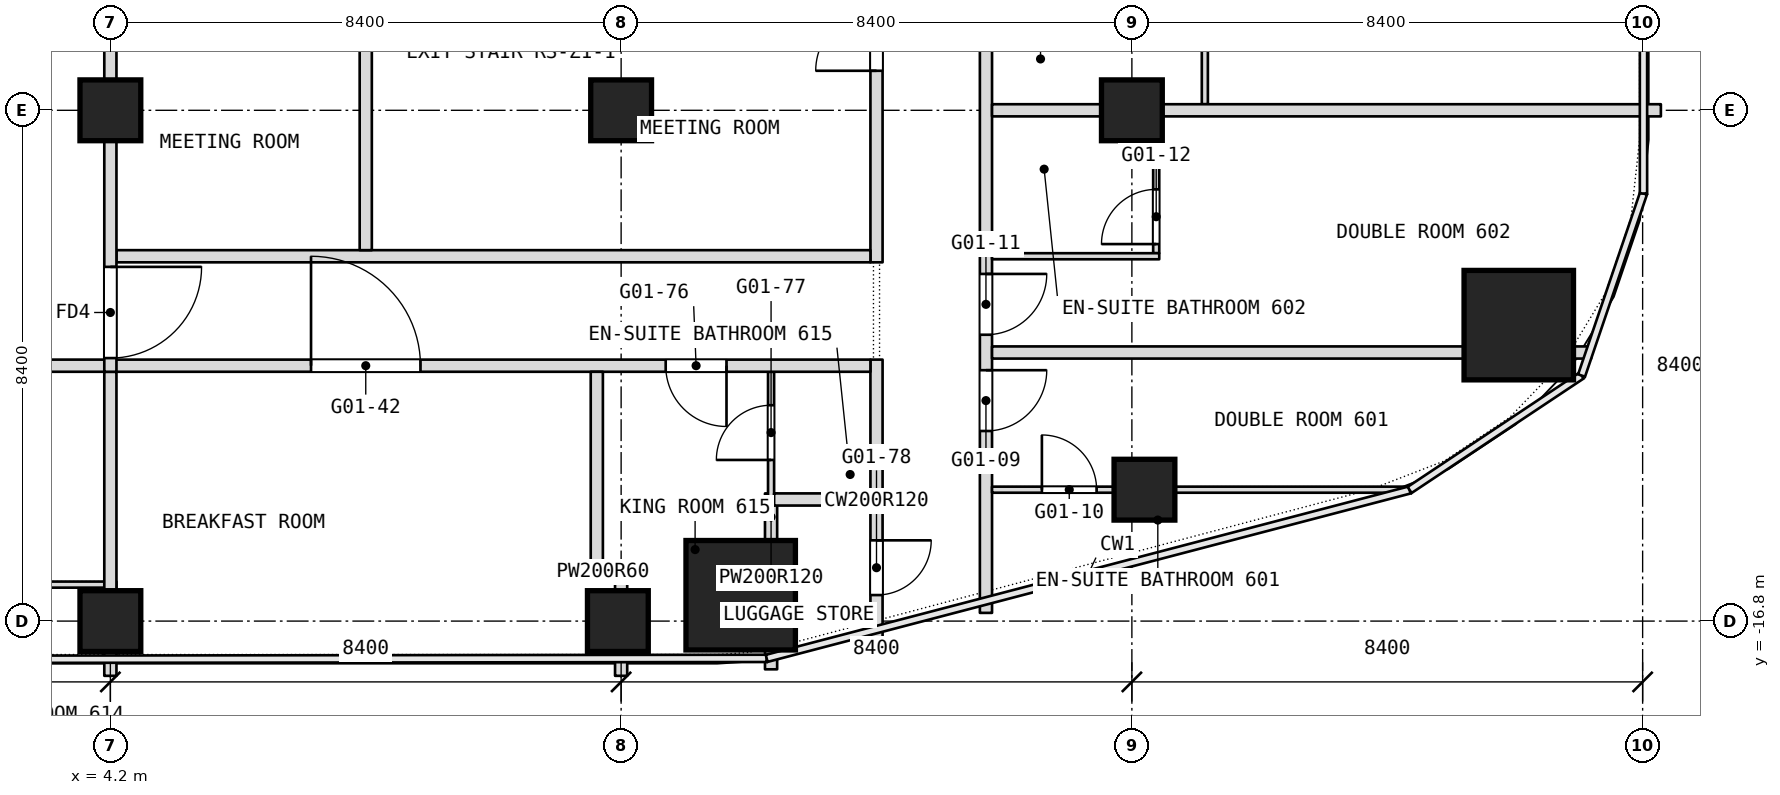
"""IFC4 building model, lengths in metres.
Left out: names, types, materials, properties, quantities, classifications, styles, units other than length and angle.
Written with IfcOpenShell. Run it as: python <this file> out.ifc"""

import sys

from ifc_helpers import new_model, si_unit, direction, frame, frame_2d, origin, origin_2d, place, context, subcontext, project, spatial, rectangle, extrude, element, fill, save


model = new_model("IFC4")
c1 = context("Model", 3, precision=1e-05, world=origin(), true_north=direction((0.0, 1.0)))
c2 = subcontext(c1, "Body", "Model", "MODEL_VIEW")
j1 = project(units=[si_unit("LENGTHUNIT", "METRE"), si_unit("PLANEANGLEUNIT", "RADIAN")], contexts=[c1])
p1 = place(None, origin())
s1 = spatial("IfcSite", under=j1, at=p1, CompositionType="ELEMENT")
p2 = place(p1, origin())
s2 = spatial("IfcBuilding", under=s1, at=p2, CompositionType="ELEMENT")
p3 = place(p2, frame((0.0, 0.0, 36.5)))
s3 = spatial("IfcBuildingStorey", under=s2, at=p3, CompositionType="ELEMENT", Elevation=36.5)
p4 = place(p3, frame((14.566, -16.375, 0.0), z_axis=(0.0, 0.0, 1.0), x_axis=(1.0, 0.0, 0.0)))
e1 = element("IfcColumn", 1, at=p4, inside=s3, PredefinedType="COLUMN", context=c2, shape_type="SweptSolid", body=[
    extrude(rectangle(XDim=1.8, YDim=1.8, at=origin_2d()), origin(), (0.0, 0.0, 1.0), 3.6),
])
p5 = place(p3, frame((27.363, -11.933, -0.15), z_axis=(0.0, 0.0, 1.0), x_axis=(1.0, 0.0, 0.0)))
e2 = element("IfcColumn", 2, at=p5, inside=s3, PredefinedType="COLUMN", context=c2, shape_type="SweptSolid", body=[
    extrude(rectangle(XDim=1.8, YDim=1.8, at=origin_2d()), origin(), (0.0, 0.0, 1.0), 3.75),
])
for number, where, z_axis, x_axis in (
    (3, (4.2, -8.4, -0.15), (0.0, 0.0, 1.0), (1.0, 0.0, 0.0)),
    (4, (12.6, -8.4, -0.15), (0.0, 0.0, 1.0), (1.0, 0.0, 0.0)),
    (5, (21.0, -8.4, -0.15), (0.0, 0.0, 1.0), (1.0, 0.0, 0.0)),
    (6, (21.207, -14.639, -0.15), (0.0, 0.0, 1.0), (1.0, 0.0, 0.0)),
):
    element("IfcColumn", number, at=place(p3, frame(where, z_axis=z_axis, x_axis=x_axis)), inside=s3, PredefinedType="COLUMN", context=c2, shape_type="SweptSolid", body=[
        extrude(rectangle(XDim=1.0, YDim=1.0, at=origin_2d()), origin(), (0.0, 0.0, 1.0), 3.75),
    ])
p6 = place(p3, frame((22.2, -8.3, 0.0), z_axis=(0.0, 0.0, 1.0), x_axis=(0.0, 1.0, 0.0)))
e7 = element("IfcWall", 7, at=p6, inside=s3, PredefinedType="PARTITIONING", context=c2, shape_type="SweptSolid", body=[
    extrude(rectangle(XDim=2.35, YDim=0.1, at=frame_2d((1.175, 0.0))), origin(), (0.0, 0.0, 1.0), 3.34),
])
p7 = place(p3, frame((21.4, -10.75, 0.0), z_axis=(0.0, 0.0, 1.0), x_axis=(0.0, 1.0, 0.0)))
e8 = element("IfcWall", 8, at=p7, inside=s3, PredefinedType="PARTITIONING", context=c2, shape_type="SweptSolid", body=[
    extrude(rectangle(XDim=2.45, YDim=0.1, at=frame_2d((1.225, 0.0))), origin(), (0.0, 0.0, 1.0), 3.34),
])
p8 = place(p7, frame((0.15, 0.0, 0.0)))
e9 = element("IfcOpeningElement", 9, at=p8, cuts=e8, PredefinedType="OPENING", context=c2, shape_type="SweptSolid", body=[
    extrude(rectangle(XDim=0.9, YDim=2.1, at=frame_2d((0.45, 1.05))), frame((0.0, 0.05, 0.0), z_axis=(0.0, -1.0, 0.0), x_axis=(1.0, 0.0, 0.0)), (0.0, 0.0, 1.0), 0.1),
])
p9 = place(p3, frame((18.6, -16.665, 0.0), z_axis=(0.0, 0.0, 1.0), x_axis=(0.0, 1.0, 0.0)))
e10 = element("IfcWall", 10, at=p9, inside=s3, PredefinedType="PARTITIONING", context=c2, shape_type="SweptSolid", body=[
    extrude(rectangle(XDim=50.205, YDim=0.2, at=frame_2d((25.103, 0.0))), origin(), (0.0, 0.0, 1.0), 3.34),
])
p10 = place(p9, frame((2.991, 0.0, 0.0)))
e11 = element("IfcOpeningElement", 11, at=p10, cuts=e10, PredefinedType="OPENING", context=c2, shape_type="SweptSolid", body=[
    extrude(rectangle(XDim=1.0, YDim=2.1, at=frame_2d((0.5, 1.05))), frame((0.0, 0.1, 0.0), z_axis=(0.0, -1.0, 0.0), x_axis=(1.0, 0.0, 0.0)), (0.0, 0.0, 1.0), 0.2),
])
p11 = place(p9, frame((4.574, 0.0, 0.0)))
e12 = element("IfcOpeningElement", 12, at=p11, cuts=e10, PredefinedType="OPENING", context=c2, shape_type="SweptSolid", body=[
    extrude(rectangle(XDim=1.0, YDim=2.1, at=frame_2d((0.5, 1.05))), frame((0.0, 0.1, 0.0), z_axis=(0.0, -1.0, 0.0), x_axis=(1.0, 0.0, 0.0)), (0.0, 0.0, 1.0), 0.2),
])
p12 = place(p9, frame((11.865, 0.0, 0.0)))
e13 = element("IfcOpeningElement", 13, at=p12, cuts=e10, PredefinedType="OPENING", context=c2, shape_type="SweptSolid", body=[
    extrude(rectangle(XDim=1.1, YDim=2.1, at=frame_2d((0.55, 1.05))), frame((0.0, 0.1, 0.0), z_axis=(0.0, -1.0, 0.0), x_axis=(1.0, 0.0, 0.0)), (0.0, 0.0, 1.0), 0.2),
])
p13 = place(p9, frame((22.415, 0.0, 0.0)))
e14 = element("IfcOpeningElement", 14, at=p13, cuts=e10, PredefinedType="OPENING", context=c2, shape_type="SweptSolid", body=[
    extrude(rectangle(XDim=1.1, YDim=2.1, at=frame_2d((0.55, 1.05))), frame((0.0, 0.1, 0.0), z_axis=(0.0, -1.0, 0.0), x_axis=(1.0, 0.0, 0.0)), (0.0, 0.0, 1.0), 0.2),
])
p14 = place(p9, frame((28.365, 0.0, 0.0)))
e15 = element("IfcOpeningElement", 15, at=p14, cuts=e10, PredefinedType="OPENING", context=c2, shape_type="SweptSolid", body=[
    extrude(rectangle(XDim=1.8, YDim=2.1, at=frame_2d((0.9, 1.05))), frame((0.0, 0.1, 0.0), z_axis=(0.0, -1.0, 0.0), x_axis=(1.0, 0.0, 0.0)), (0.0, 0.0, 1.0), 0.2),
])
p15 = place(p9, frame((36.765, 0.0, 0.0)))
e16 = element("IfcOpeningElement", 16, at=p15, cuts=e10, PredefinedType="OPENING", context=c2, shape_type="SweptSolid", body=[
    extrude(rectangle(XDim=1.8, YDim=2.1, at=frame_2d((0.9, 1.05))), frame((0.0, 0.1, 0.0), z_axis=(0.0, -1.0, 0.0), x_axis=(1.0, 0.0, 0.0)), (0.0, 0.0, 1.0), 0.2),
])
p16 = place(p9, frame((42.265, 0.0, 0.0)))
e17 = element("IfcOpeningElement", 17, at=p16, cuts=e10, PredefinedType="OPENING", context=c2, shape_type="SweptSolid", body=[
    extrude(rectangle(XDim=1.0, YDim=2.1, at=frame_2d((0.5, 1.05))), frame((0.0, 0.1, 0.0), z_axis=(0.0, -1.0, 0.0), x_axis=(1.0, 0.0, 0.0)), (0.0, 0.0, 1.0), 0.2),
])
p17 = place(p9, frame((47.465, 0.0, 0.0)))
e18 = element("IfcOpeningElement", 18, at=p17, cuts=e10, PredefinedType="OPENING", context=c2, shape_type="SweptSolid", body=[
    extrude(rectangle(XDim=1.0, YDim=2.1, at=frame_2d((0.5, 1.05))), frame((0.0, 0.1, 0.0), z_axis=(0.0, -1.0, 0.0), x_axis=(1.0, 0.0, 0.0)), (0.0, 0.0, 1.0), 0.2),
])
p18 = place(p3, frame((16.8, -17.143, 0.0), z_axis=(0.0, 0.0, 1.0), x_axis=(0.0, 1.0, 0.0)))
e19 = element("IfcWall", 19, at=p18, inside=s3, PredefinedType="PARTITIONING", context=c2, shape_type="SweptSolid", body=[
    extrude(rectangle(XDim=4.643, YDim=0.2, at=frame_2d((2.322, 0.0))), origin(), (0.0, 0.0, 1.0), 3.34),
])
p19 = place(p18, frame((0.771, 0.0, 0.0)))
e20 = element("IfcOpeningElement", 20, at=p19, cuts=e19, PredefinedType="OPENING", context=c2, shape_type="SweptSolid", body=[
    extrude(rectangle(XDim=0.9, YDim=2.1, at=frame_2d((0.45, 1.05))), frame((0.0, 0.1, 0.0), z_axis=(0.0, -1.0, 0.0), x_axis=(1.0, 0.0, 0.0)), (0.0, 0.0, 1.0), 0.2),
])
p20 = place(p3, frame((16.8, -10.9, 0.0), z_axis=(0.0, 0.0, 1.0), x_axis=(0.0, 1.0, 0.0)))
e21 = element("IfcWall", 21, at=p20, inside=s3, PredefinedType="PARTITIONING", context=c2, shape_type="SweptSolid", body=[
    extrude(rectangle(XDim=7.3, YDim=0.2, at=frame_2d((3.65, 0.0))), origin(), (0.0, 0.0, 1.0), 3.34),
])
p21 = place(p20, frame((3.15, 0.0, 0.0)))
e22 = element("IfcOpeningElement", 22, at=p21, cuts=e21, PredefinedType="OPENING", context=c2, shape_type="SweptSolid", body=[
    extrude(rectangle(XDim=1.0, YDim=2.1, at=frame_2d((0.5, 1.05))), frame((0.0, 0.1, 0.0), z_axis=(0.0, -1.0, 0.0), x_axis=(1.0, 0.0, 0.0)), (0.0, 0.0, 1.0), 0.2),
])
p22 = place(p3, frame((0.65, -16.2, 0.0), z_axis=(0.0, 0.0, 1.0), x_axis=(1.0, 0.0, 0.0)))
e23 = element("IfcWall", 23, at=p22, inside=s3, PredefinedType="PARTITIONING", context=c2, shape_type="SweptSolid", body=[
    extrude(rectangle(XDim=3.65, YDim=0.1, at=frame_2d((1.825, 0.0))), origin(), (0.0, 0.0, 1.0), 2.94),
])
p23 = place(p22, frame((0.15, 0.0, 0.0)))
e24 = element("IfcOpeningElement", 24, at=p23, cuts=e23, PredefinedType="OPENING", context=c2, shape_type="SweptSolid", body=[
    extrude(rectangle(XDim=0.9, YDim=2.1, at=frame_2d((0.45, 1.05))), frame((0.0, 0.05, 0.0), z_axis=(0.0, -1.0, 0.0), x_axis=(1.0, 0.0, 0.0)), (0.0, 0.0, 1.0), 0.1),
])
p24 = place(p3, frame((12.1, -16.0, 0.0), z_axis=(0.0, 0.0, 1.0), x_axis=(1.0, 0.0, 0.0)))
e25 = element("IfcWall", 25, at=p24, inside=s3, PredefinedType="PARTITIONING", context=c2, shape_type="SweptSolid", body=[
    extrude(rectangle(XDim=0.4, YDim=0.2, at=frame_2d((0.2, 0.0))), origin(), (0.0, 0.0, 1.0), 3.34),
])
p25 = place(p3, frame((15.066, -17.593, 0.0), z_axis=(0.0, 0.0, 1.0), x_axis=(0.0, 1.0, 0.0)))
e26 = element("IfcWall", 26, at=p25, inside=s3, PredefinedType="PARTITIONING", context=c2, shape_type="SweptSolid", body=[
    extrude(rectangle(XDim=0.318, YDim=0.2, at=frame_2d((0.159, 0.0))), origin(), (0.0, 0.0, 1.0), 3.34),
])
p26 = place(p3, frame((15.066, -15.475, 0.0), z_axis=(0.0, 0.0, 1.0), x_axis=(0.0, 1.0, 0.0)))
e27 = element("IfcWall", 27, at=p26, inside=s3, PredefinedType="PARTITIONING", context=c2, shape_type="SweptSolid", body=[
    extrude(rectangle(XDim=0.775, YDim=0.2, at=frame_2d((0.388, 0.0))), origin(), (0.0, 0.0, 1.0), 3.34),
])
p27 = place(p3, frame((15.066, -14.9, 0.0), z_axis=(0.0, 0.0, 1.0), x_axis=(0.0, 1.0, 0.0)))
e28 = element("IfcWall", 28, at=p27, inside=s3, PredefinedType="PARTITIONING", context=c2, shape_type="SweptSolid", body=[
    extrude(rectangle(XDim=2.2, YDim=0.1, at=frame_2d((1.1, 0.0))), origin(), (0.0, 0.0, 1.0), 3.34),
])
p28 = place(p27, frame((0.75, 0.0, 0.0)))
e29 = element("IfcOpeningElement", 29, at=p28, cuts=e28, PredefinedType="OPENING", context=c2, shape_type="SweptSolid", body=[
    extrude(rectangle(XDim=0.9, YDim=2.1, at=frame_2d((0.45, 1.05))), frame((0.0, 0.05, 0.0), z_axis=(0.0, -1.0, 0.0), x_axis=(1.0, 0.0, 0.0)), (0.0, 0.0, 1.0), 0.1),
])
p29 = place(p3, frame((15.116, -14.8, 0.0), z_axis=(0.0, 0.0, 1.0), x_axis=(1.0, 0.0, 0.0)))
e30 = element("IfcWall", 30, at=p29, inside=s3, PredefinedType="PARTITIONING", context=c2, shape_type="SweptSolid", body=[
    extrude(rectangle(XDim=1.584, YDim=0.2, at=frame_2d((0.792, 0.0))), origin(), (0.0, 0.0, 1.0), 3.34),
])
p30 = place(p3, frame((18.7, -14.639, 0.0), z_axis=(0.0, 0.0, 1.0), x_axis=(1.0, 0.0, 0.0)))
e31 = element("IfcWall", 31, at=p30, inside=s3, PredefinedType="PARTITIONING", context=c2, shape_type="SweptSolid", body=[
    extrude(rectangle(XDim=6.845, YDim=0.1, at=frame_2d((3.422, 0.0))), origin(), (0.0, 0.0, 1.0), 3.34),
])
p31 = place(p30, frame((0.82, 0.0, 0.0)))
e32 = element("IfcOpeningElement", 32, at=p31, cuts=e31, PredefinedType="OPENING", context=c2, shape_type="SweptSolid", body=[
    extrude(rectangle(XDim=0.9, YDim=2.1, at=frame_2d((0.45, 1.05))), frame((0.0, 0.05, 0.0), z_axis=(0.0, -1.0, 0.0), x_axis=(1.0, 0.0, 0.0)), (0.0, 0.0, 1.0), 0.1),
])
p32 = place(p3, frame((12.6, -17.7, 0.0), z_axis=(0.0, 0.0, 1.0), x_axis=(0.0, 1.0, 0.0)))
e33 = element("IfcWall", 33, at=p32, inside=s3, PredefinedType="PARTITIONING", context=c2, shape_type="SweptSolid", body=[
    extrude(rectangle(XDim=1.8, YDim=0.2, at=frame_2d((0.9, 0.0))), origin(), (0.0, 0.0, 1.0), 3.34),
])
p33 = place(p3, frame((-16.7, -12.6, 0.0), z_axis=(0.0, 0.0, 1.0), x_axis=(1.0, 0.0, 0.0)))
e34 = element("IfcWall", 34, at=p33, inside=s3, PredefinedType="PARTITIONING", context=c2, shape_type="SweptSolid", body=[
    extrude(rectangle(XDim=33.4, YDim=0.2, at=frame_2d((16.7, 0.0))), origin(), (0.0, 0.0, 1.0), 3.34),
])
p34 = place(p33, frame((6.9, 0.0, 0.0)))
e35 = element("IfcOpeningElement", 35, at=p34, cuts=e34, PredefinedType="OPENING", context=c2, shape_type="SweptSolid", body=[
    extrude(rectangle(XDim=1.0, YDim=2.1, at=frame_2d((0.5, 1.05))), frame((0.0, 0.1, 0.0), z_axis=(0.0, -1.0, 0.0), x_axis=(1.0, 0.0, 0.0)), (0.0, 0.0, 1.0), 0.2),
])
p35 = place(p33, frame((8.7, 0.0, 0.0)))
e36 = element("IfcOpeningElement", 36, at=p35, cuts=e34, PredefinedType="OPENING", context=c2, shape_type="SweptSolid", body=[
    extrude(rectangle(XDim=1.0, YDim=2.1, at=frame_2d((0.5, 1.05))), frame((0.0, 0.1, 0.0), z_axis=(0.0, -1.0, 0.0), x_axis=(1.0, 0.0, 0.0)), (0.0, 0.0, 1.0), 0.2),
])
p36 = place(p33, frame((16.1, 0.0, 0.0)))
e37 = element("IfcOpeningElement", 37, at=p36, cuts=e34, PredefinedType="OPENING", context=c2, shape_type="SweptSolid", body=[
    extrude(rectangle(XDim=1.1, YDim=2.1, at=frame_2d((0.55, 1.05))), frame((0.0, 0.1, 0.0), z_axis=(0.0, -1.0, 0.0), x_axis=(1.0, 0.0, 0.0)), (0.0, 0.0, 1.0), 0.2),
])
p37 = place(p33, frame((24.2, 0.0, 0.0)))
e38 = element("IfcOpeningElement", 38, at=p37, cuts=e34, PredefinedType="OPENING", context=c2, shape_type="SweptSolid", body=[
    extrude(rectangle(XDim=1.8, YDim=2.1, at=frame_2d((0.9, 1.05))), frame((0.0, 0.1, 0.0), z_axis=(0.0, -1.0, 0.0), x_axis=(1.0, 0.0, 0.0)), (0.0, 0.0, 1.0), 0.2),
])
p38 = place(p33, frame((2.317, 0.0, 0.0)))
e39 = element("IfcOpeningElement", 39, at=p38, cuts=e34, PredefinedType="OPENING", context=c2, shape_type="SweptSolid", body=[
    extrude(rectangle(XDim=1.0, YDim=2.1, at=frame_2d((0.5, 1.05))), frame((0.0, 0.1, 0.0), z_axis=(0.0, -1.0, 0.0), x_axis=(1.0, 0.0, 0.0)), (0.0, 0.0, 1.0), 0.2),
])
p39 = place(p33, frame((30.033, 0.0, 0.0)))
e40 = element("IfcOpeningElement", 40, at=p39, cuts=e34, PredefinedType="OPENING", context=c2, shape_type="SweptSolid", body=[
    extrude(rectangle(XDim=1.0, YDim=2.1, at=frame_2d((0.5, 1.05))), frame((0.0, 0.1, 0.0), z_axis=(0.0, -1.0, 0.0), x_axis=(1.0, 0.0, 0.0)), (0.0, 0.0, 1.0), 0.2),
])
p40 = place(p3, frame((18.7, -12.383, 0.0), z_axis=(0.0, 0.0, 1.0), x_axis=(1.0, 0.0, 0.0)))
e41 = element("IfcWall", 41, at=p40, inside=s3, PredefinedType="PARTITIONING", context=c2, shape_type="SweptSolid", body=[
    extrude(rectangle(XDim=7.763, YDim=0.2, at=frame_2d((3.881, 0.0))), origin(), (0.0, 0.0, 1.0), 3.34),
])
p41 = place(p3, frame((28.263, -12.383, 0.0), z_axis=(0.0, 0.0, 1.0), x_axis=(1.0, 0.0, 0.0)))
e42 = element("IfcWall", 42, at=p41, inside=s3, PredefinedType="PARTITIONING", context=c2, shape_type="SweptSolid", body=[
    extrude(rectangle(XDim=0.29, YDim=0.2, at=frame_2d((0.145, 0.0))), origin(), (0.0, 0.0, 1.0), 3.34),
])
p42 = place(p3, frame((12.2, -15.9, 0.0), z_axis=(0.0, 0.0, 1.0), x_axis=(0.0, 1.0, 0.0)))
e43 = element("IfcWall", 43, at=p42, inside=s3, PredefinedType="PARTITIONING", context=c2, shape_type="SweptSolid", body=[
    extrude(rectangle(XDim=3.2, YDim=0.2, at=frame_2d((1.6, 0.0))), origin(), (0.0, 0.0, 1.0), 3.34),
])
p43 = place(p3, frame((18.7, -10.8, 0.0), z_axis=(0.0, 0.0, 1.0), x_axis=(1.0, 0.0, 0.0)))
e44 = element("IfcWall", 44, at=p43, inside=s3, PredefinedType="PARTITIONING", context=c2, shape_type="SweptSolid", body=[
    extrude(rectangle(XDim=2.75, YDim=0.1, at=frame_2d((1.375, 0.0))), origin(), (0.0, 0.0, 1.0), 3.34),
])
p44 = place(p3, frame((4.3, -10.8, 0.0), z_axis=(0.0, 0.0, 1.0), x_axis=(1.0, 0.0, 0.0)))
e45 = element("IfcWall", 45, at=p44, inside=s3, PredefinedType="PARTITIONING", context=c2, shape_type="SweptSolid", body=[
    extrude(rectangle(XDim=12.4, YDim=0.2, at=frame_2d((6.2, 0.0))), origin(), (0.0, 0.0, 1.0), 3.34),
])
p45 = place(p3, frame((8.4, -10.7, 0.0), z_axis=(0.0, 0.0, 1.0), x_axis=(0.0, 1.0, 0.0)))
e46 = element("IfcWall", 46, at=p45, inside=s3, PredefinedType="PARTITIONING", context=c2, shape_type="SweptSolid", body=[
    extrude(rectangle(XDim=3.6, YDim=0.2, at=frame_2d((1.8, 0.0))), origin(), (0.0, 0.0, 1.0), 3.34),
])
p46 = place(p3, frame((18.7, -8.4, 0.0), z_axis=(0.0, 0.0, 1.0), x_axis=(1.0, 0.0, 0.0)))
e47 = element("IfcWall", 47, at=p46, inside=s3, PredefinedType="PARTITIONING", context=c2, shape_type="SweptSolid", body=[
    extrude(rectangle(XDim=11.0, YDim=0.2, at=frame_2d((5.5, 0.0))), origin(), (0.0, 0.0, 1.0), 2.84),
])
p47 = place(p3, frame((4.2, -17.7, 0.0), z_axis=(0.0, 0.0, 1.0), x_axis=(0.0, 1.0, 0.0)))
e48 = element("IfcWall", 48, at=p47, inside=s3, PredefinedType="PARTITIONING", context=c2, shape_type="SweptSolid", body=[
    extrude(rectangle(XDim=5.0, YDim=0.2, at=frame_2d((2.5, 0.0))), origin(), (0.0, 0.0, 1.0), 3.34),
])
p48 = place(p3, frame((4.2, -12.7, 0.0), z_axis=(0.0, 0.0, 1.0), x_axis=(0.0, 1.0, 0.0)))
e49 = element("IfcWall", 49, at=p48, inside=s3, PredefinedType="PARTITIONING", context=c2, shape_type="SweptSolid", body=[
    extrude(rectangle(XDim=12.7, YDim=0.2, at=frame_2d((6.35, 0.0))), origin(), (0.0, 0.0, 1.0), 3.34),
])
p49 = place(p48, frame((11.05, 0.0, 0.0)))
e50 = element("IfcOpeningElement", 50, at=p49, cuts=e49, PredefinedType="OPENING", context=c2, shape_type="SweptSolid", body=[
    extrude(rectangle(XDim=1.5, YDim=2.1, at=frame_2d((0.75, 1.05))), frame((0.0, 0.1, 0.0), z_axis=(0.0, -1.0, 0.0), x_axis=(1.0, 0.0, 0.0)), (0.0, 0.0, 1.0), 0.2),
])
p50 = place(p48, frame((0.225, 0.0, 0.0)))
e51 = element("IfcOpeningElement", 51, at=p50, cuts=e49, PredefinedType="OPENING", context=c2, shape_type="SweptSolid", body=[
    extrude(rectangle(XDim=1.5, YDim=2.1, at=frame_2d((0.75, 1.05))), frame((0.0, 0.1, 0.0), z_axis=(0.0, -1.0, 0.0), x_axis=(1.0, 0.0, 0.0)), (0.0, 0.0, 1.0), 0.2),
])
p51 = place(p8, origin())
e52 = element("IfcDoor", 52, at=p51, inside=s3, OperationType="SINGLE_SWING_LEFT", PredefinedType="DOOR", context=c2, shape_type="SweptSolid", body=[
    extrude(rectangle(XDim=0.9, YDim=2.1, at=frame_2d((0.45, 1.05))), frame((0.0, 0.025, 0.0), z_axis=(0.0, -1.0, 0.0), x_axis=(1.0, 0.0, 0.0)), (0.0, 0.0, 1.0), 0.05),
])
fill(e9, e52)
p52 = place(p10, origin())
e53 = element("IfcDoor", 53, at=p52, inside=s3, OperationType="SINGLE_SWING_LEFT", PredefinedType="DOOR", context=c2, shape_type="SweptSolid", body=[
    extrude(rectangle(XDim=1.0, YDim=2.1, at=frame_2d((0.5, 1.05))), frame((0.0, 0.025, 0.0), z_axis=(0.0, -1.0, 0.0), x_axis=(1.0, 0.0, 0.0)), (0.0, 0.0, 1.0), 0.05),
])
fill(e11, e53)
p53 = place(p11, origin())
e54 = element("IfcDoor", 54, at=p53, inside=s3, OperationType="SINGLE_SWING_LEFT", PredefinedType="DOOR", context=c2, shape_type="SweptSolid", body=[
    extrude(rectangle(XDim=1.0, YDim=2.1, at=frame_2d((0.5, 1.05))), frame((0.0, 0.025, 0.0), z_axis=(0.0, -1.0, 0.0), x_axis=(1.0, 0.0, 0.0)), (0.0, 0.0, 1.0), 0.05),
])
fill(e12, e54)
p54 = place(p19, origin())
e55 = element("IfcDoor", 55, at=p54, inside=s3, OperationType="SINGLE_SWING_RIGHT", PredefinedType="DOOR", context=c2, shape_type="SweptSolid", body=[
    extrude(rectangle(XDim=0.9, YDim=2.1, at=frame_2d((0.45, 1.05))), frame((0.0, 0.025, 0.0), z_axis=(0.0, -1.0, 0.0), x_axis=(1.0, 0.0, 0.0)), (0.0, 0.0, 1.0), 0.05),
])
fill(e20, e55)
p55 = place(p21, origin())
e56 = element("IfcDoor", 56, at=p55, inside=s3, OperationType="SINGLE_SWING_LEFT", PredefinedType="DOOR", context=c2, shape_type="SweptSolid", body=[
    extrude(rectangle(XDim=1.0, YDim=2.1, at=frame_2d((0.5, 1.05))), frame((0.0, 0.025, 0.0), z_axis=(0.0, -1.0, 0.0), x_axis=(1.0, 0.0, 0.0)), (0.0, 0.0, 1.0), 0.05),
])
fill(e22, e56)
p56 = place(p28, origin())
e57 = element("IfcDoor", 57, at=p56, inside=s3, OperationType="SINGLE_SWING_LEFT", PredefinedType="DOOR", context=c2, shape_type="SweptSolid", body=[
    extrude(rectangle(XDim=0.9, YDim=2.1, at=frame_2d((0.45, 1.05))), frame((0.0, 0.025, 0.0), z_axis=(0.0, -1.0, 0.0), x_axis=(1.0, 0.0, 0.0)), (0.0, 0.0, 1.0), 0.05),
])
fill(e29, e57)
p57 = place(p31, origin())
e58 = element("IfcDoor", 58, at=p57, inside=s3, OperationType="SINGLE_SWING_LEFT", PredefinedType="DOOR", context=c2, shape_type="SweptSolid", body=[
    extrude(rectangle(XDim=0.9, YDim=2.1, at=frame_2d((0.45, 1.05))), frame((0.0, 0.025, 0.0), z_axis=(0.0, -1.0, 0.0), x_axis=(1.0, 0.0, 0.0)), (0.0, 0.0, 1.0), 0.05),
])
fill(e32, e58)
p58 = place(p37, origin())
e59 = element("IfcDoor", 59, at=p58, inside=s3, OperationType="DOUBLE_DOOR_SINGLE_SWING", PredefinedType="DOOR", context=c2, shape_type="SweptSolid", body=[
    extrude(rectangle(XDim=1.8, YDim=2.1, at=frame_2d((0.9, 1.05))), frame((0.0, 0.025, 0.0), z_axis=(0.0, -1.0, 0.0), x_axis=(1.0, 0.0, 0.0)), (0.0, 0.0, 1.0), 0.05),
])
fill(e38, e59)
p59 = place(p39, origin())
e60 = element("IfcDoor", 60, at=p59, inside=s3, OperationType="SINGLE_SWING_LEFT", PredefinedType="DOOR", context=c2, shape_type="SweptSolid", body=[
    extrude(rectangle(XDim=1.0, YDim=2.1, at=frame_2d((0.5, 1.05))), frame((0.0, 0.025, 0.0), z_axis=(0.0, -1.0, 0.0), x_axis=(1.0, 0.0, 0.0)), (0.0, 0.0, 1.0), 0.05),
])
fill(e40, e60)
p60 = place(p50, origin())
e61 = element("IfcDoor", 61, at=p60, inside=s3, OperationType="DOUBLE_DOOR_DOUBLE_SWING", PredefinedType="DOOR", context=c2, shape_type="SweptSolid", body=[
    extrude(rectangle(XDim=1.5, YDim=2.1, at=frame_2d((0.75, 1.05))), frame((0.0, 0.025, 0.0), z_axis=(0.0, -1.0, 0.0), x_axis=(1.0, 0.0, 0.0)), (0.0, 0.0, 1.0), 0.05),
])
fill(e51, e61)
save(model, sys.argv[1])
